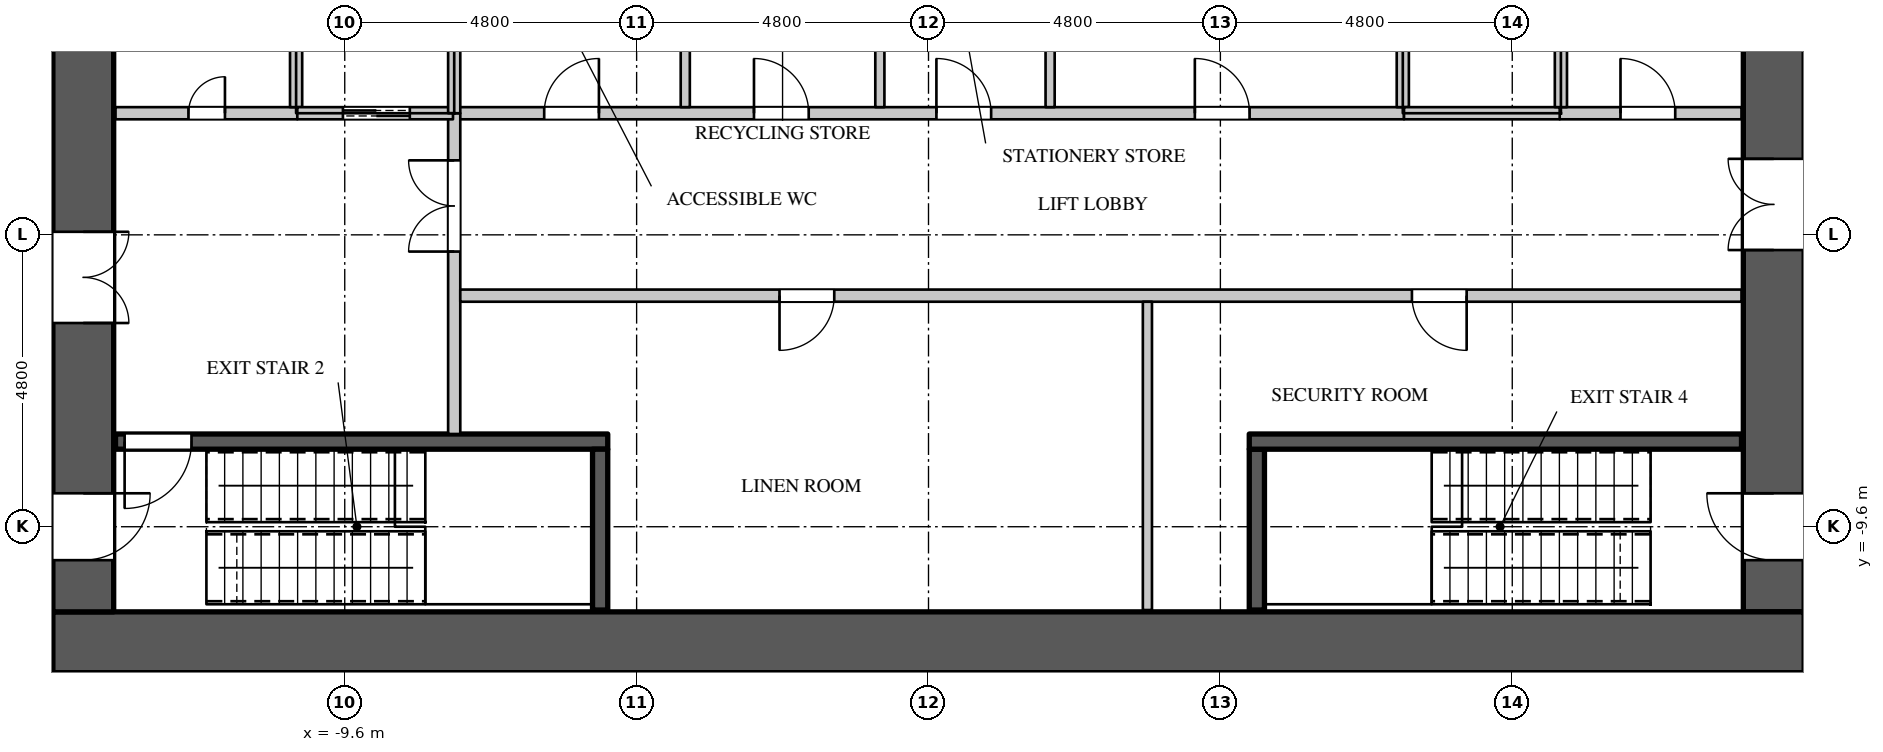
"""IFC4 building model, lengths in metres.
Left out: names, types, materials, properties, quantities, classifications, styles, units other than length and angle.
Written with IfcOpenShell. Run it as: python <this file> out.ifc"""

import sys

from ifc_helpers import new_model, si_unit, direction, frame, frame_2d, origin, place, context, subcontext, project, spatial, rectangle, extrude, element, fill, save


model = new_model("IFC4")
c1 = context("Model", 3, precision=1e-05, world=origin(), true_north=direction((0.0, 1.0)))
c2 = subcontext(c1, "Body", "Model", "MODEL_VIEW")
j1 = project(units=[si_unit("LENGTHUNIT", "METRE"), si_unit("PLANEANGLEUNIT", "RADIAN")], contexts=[c1])
p1 = place(None, origin())
s1 = spatial("IfcSite", under=j1, at=p1, CompositionType="ELEMENT")
p2 = place(p1, origin())
s2 = spatial("IfcBuilding", under=s1, at=p2, CompositionType="ELEMENT")
p3 = place(p2, frame((0.0, 0.0, 59.1)))
s3 = spatial("IfcBuildingStorey", under=s2, at=p3, CompositionType="ELEMENT", Elevation=59.1)
p4 = place(p3, frame((-14.4, -11.5, 0.0), z_axis=(0.0, 0.0, 1.0), x_axis=(1.0, 0.0, 0.0)))
e1 = element("IfcWall", 1, at=p4, inside=s3, PredefinedType="SHEAR", context=c2, shape_type="SweptSolid", body=[
    extrude(rectangle(XDim=28.8, YDim=1.0, at=frame_2d((14.4, 0.0))), origin(), (0.0, 0.0, 1.0), 4.2),
])
p5 = place(p3, frame((13.9, -11.0, 0.0), z_axis=(0.0, 0.0, 1.0), x_axis=(0.0, 1.0, 0.0)))
e2 = element("IfcWall", 2, at=p5, inside=s3, PredefinedType="SHEAR", context=c2, shape_type="SweptSolid", body=[
    extrude(rectangle(XDim=22.0, YDim=1.0, at=frame_2d((11.0, 0.0))), origin(), (0.0, 0.0, 1.0), 4.2),
])
p6 = place(p5, frame((20.05, 0.0, 0.0)))
e3 = element("IfcOpeningElement", 3, at=p6, cuts=e2, PredefinedType="OPENING", context=c2, shape_type="SweptSolid", body=[
    extrude(rectangle(XDim=1.1, YDim=2.2, at=frame_2d((0.55, 1.1))), frame((0.0, 0.51, 0.0), z_axis=(0.0, -1.0, 0.0), x_axis=(1.0, 0.0, 0.0)), (0.0, 0.0, 1.0), 1.02),
])
p7 = place(p5, frame((0.85, 0.0, 0.0)))
e4 = element("IfcOpeningElement", 4, at=p7, cuts=e2, PredefinedType="OPENING", context=c2, shape_type="SweptSolid", body=[
    extrude(rectangle(XDim=1.1, YDim=2.2, at=frame_2d((0.55, 1.1))), frame((0.0, 0.51, 0.0), z_axis=(0.0, -1.0, 0.0), x_axis=(1.0, 0.0, 0.0)), (0.0, 0.0, 1.0), 1.02),
])
p8 = place(p5, frame((14.55, 0.0, 0.0)))
e5 = element("IfcOpeningElement", 5, at=p8, cuts=e2, PredefinedType="OPENING", context=c2, shape_type="SweptSolid", body=[
    extrude(rectangle(XDim=1.5, YDim=2.4, at=frame_2d((0.75, 1.2))), frame((0.0, 0.51, 0.0), z_axis=(0.0, -1.0, 0.0), x_axis=(1.0, 0.0, 0.0)), (0.0, 0.0, 1.0), 1.02),
])
p9 = place(p5, frame((5.95, 0.0, 0.0)))
e6 = element("IfcOpeningElement", 6, at=p9, cuts=e2, PredefinedType="OPENING", context=c2, shape_type="SweptSolid", body=[
    extrude(rectangle(XDim=1.5, YDim=2.4, at=frame_2d((0.75, 1.2))), frame((0.0, 0.51, 0.0), z_axis=(0.0, -1.0, 0.0), x_axis=(1.0, 0.0, 0.0)), (0.0, 0.0, 1.0), 1.02),
])
p10 = place(p3, frame((-13.9, -11.0, 0.0), z_axis=(0.0, 0.0, 1.0), x_axis=(0.0, 1.0, 0.0)))
e7 = element("IfcWall", 7, at=p10, inside=s3, PredefinedType="SHEAR", context=c2, shape_type="SweptSolid", body=[
    extrude(rectangle(XDim=22.0, YDim=1.0, at=frame_2d((11.0, 0.0))), origin(), (0.0, 0.0, 1.0), 4.2),
])
p11 = place(p10, frame((20.05, 0.0, 0.0)))
e8 = element("IfcOpeningElement", 8, at=p11, cuts=e7, PredefinedType="OPENING", context=c2, shape_type="SweptSolid", body=[
    extrude(rectangle(XDim=1.1, YDim=2.2, at=frame_2d((0.55, 1.1))), frame((0.0, 0.51, 0.0), z_axis=(0.0, -1.0, 0.0), x_axis=(1.0, 0.0, 0.0)), (0.0, 0.0, 1.0), 1.02),
])
p12 = place(p10, frame((0.85, 0.0, 0.0)))
e9 = element("IfcOpeningElement", 9, at=p12, cuts=e7, PredefinedType="OPENING", context=c2, shape_type="SweptSolid", body=[
    extrude(rectangle(XDim=1.1, YDim=2.2, at=frame_2d((0.55, 1.1))), frame((0.0, 0.51, 0.0), z_axis=(0.0, -1.0, 0.0), x_axis=(1.0, 0.0, 0.0)), (0.0, 0.0, 1.0), 1.02),
])
p13 = place(p10, frame((15.75, 0.0, 0.0)))
e10 = element("IfcOpeningElement", 10, at=p13, cuts=e7, PredefinedType="OPENING", context=c2, shape_type="SweptSolid", body=[
    extrude(rectangle(XDim=1.5, YDim=2.4, at=frame_2d((0.75, 1.2))), frame((0.0, 0.51, 0.0), z_axis=(0.0, -1.0, 0.0), x_axis=(1.0, 0.0, 0.0)), (0.0, 0.0, 1.0), 1.02),
])
p14 = place(p10, frame((4.75, 0.0, 0.0)))
e11 = element("IfcOpeningElement", 11, at=p14, cuts=e7, PredefinedType="OPENING", context=c2, shape_type="SweptSolid", body=[
    extrude(rectangle(XDim=1.5, YDim=2.4, at=frame_2d((0.75, 1.2))), frame((0.0, 0.51, 0.0), z_axis=(0.0, -1.0, 0.0), x_axis=(1.0, 0.0, 0.0)), (0.0, 0.0, 1.0), 1.02),
])
p15 = place(p3, frame((-7.82, -2.8, 0.0), z_axis=(0.0, 0.0, 1.0), x_axis=(1.0, 0.0, 0.0)))
e12 = element("IfcWall", 12, at=p15, inside=s3, PredefinedType="PARTITIONING", context=c2, shape_type="SweptSolid", body=[
    extrude(rectangle(XDim=15.64, YDim=0.2, at=frame_2d((7.82, 0.0))), origin(), (0.0, 0.0, 1.0), 3.95),
])
p16 = place(p15, frame((1.5, 0.0, 0.0)))
e13 = element("IfcOpeningElement", 13, at=p16, cuts=e12, PredefinedType="OPENING", context=c2, shape_type="SweptSolid", body=[
    extrude(rectangle(XDim=0.9, YDim=2.2, at=frame_2d((0.45, 1.1))), frame((0.0, 0.11, 0.0), z_axis=(0.0, -1.0, 0.0), x_axis=(1.0, 0.0, 0.0)), (0.0, 0.0, 1.0), 0.22),
])
p17 = place(p15, frame((4.95, 0.0, 0.0)))
e14 = element("IfcOpeningElement", 14, at=p17, cuts=e12, PredefinedType="OPENING", context=c2, shape_type="SweptSolid", body=[
    extrude(rectangle(XDim=0.9, YDim=2.2, at=frame_2d((0.45, 1.1))), frame((0.0, 0.11, 0.0), z_axis=(0.0, -1.0, 0.0), x_axis=(1.0, 0.0, 0.0)), (0.0, 0.0, 1.0), 0.22),
])
p18 = place(p15, frame((7.95, 0.0, 0.0)))
e15 = element("IfcOpeningElement", 15, at=p18, cuts=e12, PredefinedType="OPENING", context=c2, shape_type="SweptSolid", body=[
    extrude(rectangle(XDim=0.9, YDim=2.2, at=frame_2d((0.45, 1.1))), frame((0.0, 0.11, 0.0), z_axis=(0.0, -1.0, 0.0), x_axis=(1.0, 0.0, 0.0)), (0.0, 0.0, 1.0), 0.22),
])
p19 = place(p15, frame((12.2, 0.0, 0.0)))
e16 = element("IfcOpeningElement", 16, at=p19, cuts=e12, PredefinedType="OPENING", context=c2, shape_type="SweptSolid", body=[
    extrude(rectangle(XDim=0.9, YDim=2.2, at=frame_2d((0.45, 1.1))), frame((0.0, 0.11, 0.0), z_axis=(0.0, -1.0, 0.0), x_axis=(1.0, 0.0, 0.0)), (0.0, 0.0, 1.0), 0.22),
])
p20 = place(p3, frame((-7.8, -8.075, 0.0), z_axis=(0.0, 0.0, 1.0), x_axis=(0.0, 1.0, 0.0)))
e17 = element("IfcWall", 17, at=p20, inside=s3, PredefinedType="PARTITIONING", context=c2, shape_type="SweptSolid", body=[
    extrude(rectangle(XDim=5.275, YDim=0.2, at=frame_2d((2.637, 0.0))), origin(), (0.0, 0.0, 1.0), 3.95),
])
p21 = place(p20, frame((3.0, 0.0, 0.0)))
e18 = element("IfcOpeningElement", 18, at=p21, cuts=e17, PredefinedType="OPENING", context=c2, shape_type="SweptSolid", body=[
    extrude(rectangle(XDim=1.5, YDim=2.4, at=frame_2d((0.75, 1.2))), frame((0.0, 0.11, 0.0), z_axis=(0.0, -1.0, 0.0), x_axis=(1.0, 0.0, 0.0)), (0.0, 0.0, 1.0), 0.22),
])
p22 = place(p3, frame((-7.7, -5.8, 0.0), z_axis=(0.0, 0.0, 1.0), x_axis=(1.0, 0.0, 0.0)))
e19 = element("IfcWall", 19, at=p22, inside=s3, PredefinedType="PARTITIONING", context=c2, shape_type="SweptSolid", body=[
    extrude(rectangle(XDim=21.07, YDim=0.2, at=frame_2d((10.535, 0.0))), origin(), (0.0, 0.0, 1.0), 3.95),
])
p23 = place(p22, frame((5.25, 0.0, 0.0)))
e20 = element("IfcOpeningElement", 20, at=p23, cuts=e19, PredefinedType="OPENING", context=c2, shape_type="SweptSolid", body=[
    extrude(rectangle(XDim=0.9, YDim=2.2, at=frame_2d((0.45, 1.1))), frame((0.0, 0.11, 0.0), z_axis=(0.0, -1.0, 0.0), x_axis=(1.0, 0.0, 0.0)), (0.0, 0.0, 1.0), 0.22),
])
p24 = place(p22, frame((15.65, 0.0, 0.0)))
e21 = element("IfcOpeningElement", 21, at=p24, cuts=e19, PredefinedType="OPENING", context=c2, shape_type="SweptSolid", body=[
    extrude(rectangle(XDim=0.9, YDim=2.2, at=frame_2d((0.45, 1.1))), frame((0.0, 0.11, 0.0), z_axis=(0.0, -1.0, 0.0), x_axis=(1.0, 0.0, 0.0)), (0.0, 0.0, 1.0), 0.22),
])
for number, where, z_axis, x_axis in (
    (22, (-4.0, -2.7, 0.0), (0.0, 0.0, 1.0), (0.0, 1.0, 0.0)),
    (23, (-0.8, -2.7, 0.0), (0.0, 0.0, 1.0), (0.0, 1.0, 0.0)),
    (24, (2.0, -2.7, 0.0), (0.0, 0.0, 1.0), (0.0, 1.0, 0.0)),
):
    element("IfcWall", number, at=place(p3, frame(where, z_axis=z_axis, x_axis=x_axis)), inside=s3, PredefinedType="PARTITIONING", context=c2, shape_type="SweptSolid", body=[
        extrude(rectangle(XDim=2.6, YDim=0.15, at=frame_2d((1.3, 0.0))), origin(), (0.0, 0.0, 1.0), 3.95),
    ])
p25 = place(p3, frame((3.6, -10.97, 0.0), z_axis=(0.0, 0.0, 1.0), x_axis=(0.0, 1.0, 0.0)))
e25 = element("IfcWall", 25, at=p25, inside=s3, PredefinedType="PARTITIONING", context=c2, shape_type="SweptSolid", body=[
    extrude(rectangle(XDim=5.07, YDim=0.15, at=frame_2d((2.535, 0.0))), origin(), (0.0, 0.0, 1.0), 3.95),
])
p26 = place(p3, frame((-13.37, -2.8, 0.0), z_axis=(0.0, 0.0, 1.0), x_axis=(1.0, 0.0, 0.0)))
e26 = element("IfcWall", 26, at=p26, inside=s3, PredefinedType="PARTITIONING", context=c2, shape_type="SweptSolid", body=[
    extrude(rectangle(XDim=2.99, YDim=0.2, at=frame_2d((1.495, 0.0))), origin(), (0.0, 0.0, 1.0), 3.95),
])
p27 = place(p26, frame((1.2, 0.0, 0.0)))
e27 = element("IfcOpeningElement", 27, at=p27, cuts=e26, PredefinedType="OPENING", context=c2, shape_type="SweptSolid", body=[
    extrude(rectangle(XDim=0.6, YDim=2.0, at=frame_2d((0.3, 1.0))), frame((0.0, 0.11, 0.0), z_axis=(0.0, -1.0, 0.0), x_axis=(1.0, 0.0, 0.0)), (0.0, 0.0, 1.0), 0.22),
])
p28 = place(p3, frame((10.38, -2.8, 0.0), z_axis=(0.0, 0.0, 1.0), x_axis=(1.0, 0.0, 0.0)))
e28 = element("IfcWall", 28, at=p28, inside=s3, PredefinedType="PARTITIONING", context=c2, shape_type="SweptSolid", body=[
    extrude(rectangle(XDim=2.99, YDim=0.2, at=frame_2d((1.495, 0.0))), origin(), (0.0, 0.0, 1.0), 3.95),
])
p29 = place(p28, frame((1.0, 0.0, 0.0)))
e29 = element("IfcOpeningElement", 29, at=p29, cuts=e28, PredefinedType="OPENING", context=c2, shape_type="SweptSolid", body=[
    extrude(rectangle(XDim=0.9, YDim=2.2, at=frame_2d((0.45, 1.1))), frame((0.0, 0.11, 0.0), z_axis=(0.0, -1.0, 0.0), x_axis=(1.0, 0.0, 0.0)), (0.0, 0.0, 1.0), 0.22),
])
p30 = place(p3, frame((-10.4, -2.7, 0.0), z_axis=(0.0, 0.0, 1.0), x_axis=(0.0, 1.0, 0.0)))
e30 = element("IfcWall", 30, at=p30, inside=s3, PredefinedType="PARTITIONING", context=c2, shape_type="SweptSolid", body=[
    extrude(rectangle(XDim=2.7, YDim=0.2, at=frame_2d((1.35, 0.0))), origin(), (0.0, 0.0, 1.0), 3.95),
])
p31 = place(p3, frame((-10.38, -2.8, 0.0), z_axis=(0.0, 0.0, 1.0), x_axis=(1.0, 0.0, 0.0)))
e31 = element("IfcWall", 31, at=p31, inside=s3, PredefinedType="PARTITIONING", context=c2, shape_type="SweptSolid", body=[
    extrude(rectangle(XDim=2.56, YDim=0.2, at=frame_2d((1.28, 0.0))), origin(), (0.0, 0.0, 1.0), 3.95),
])
p32 = place(p31, frame((0.75, 0.0, 0.0)))
e32 = element("IfcOpeningElement", 32, at=p32, cuts=e31, PredefinedType="OPENING", context=c2, shape_type="SweptSolid", body=[
    extrude(rectangle(XDim=1.1, YDim=2.2, at=frame_2d((0.55, 1.1))), frame((0.0, 0.11, 0.0), z_axis=(0.0, -1.0, 0.0), x_axis=(1.0, 0.0, 0.0)), (0.0, 0.0, 1.0), 0.22),
])
p33 = place(p3, frame((-7.8, -2.8, 0.0), z_axis=(0.0, 0.0, 1.0), x_axis=(0.0, 1.0, 0.0)))
e33 = element("IfcWall", 33, at=p33, inside=s3, PredefinedType="PARTITIONING", context=c2, shape_type="SweptSolid", body=[
    extrude(rectangle(XDim=2.8, YDim=0.2, at=frame_2d((1.4, 0.0))), origin(), (0.0, 0.0, 1.0), 3.95),
])
p34 = place(p3, frame((7.8, -2.7, 0.0), z_axis=(0.0, 0.0, 1.0), x_axis=(0.0, 1.0, 0.0)))
e34 = element("IfcWall", 34, at=p34, inside=s3, PredefinedType="PARTITIONING", context=c2, shape_type="SweptSolid", body=[
    extrude(rectangle(XDim=2.7, YDim=0.2, at=frame_2d((1.35, 0.0))), origin(), (0.0, 0.0, 1.0), 3.95),
])
p35 = place(p3, frame((7.82, -2.8, 0.0), z_axis=(0.0, 0.0, 1.0), x_axis=(1.0, 0.0, 0.0)))
e35 = element("IfcWall", 35, at=p35, inside=s3, PredefinedType="PARTITIONING", context=c2, shape_type="SweptSolid", body=[
    extrude(rectangle(XDim=2.56, YDim=0.2, at=frame_2d((1.28, 0.0))), origin(), (0.0, 0.0, 1.0), 3.95),
])
p36 = place(p3, frame((10.4, -2.7, 0.0), z_axis=(0.0, 0.0, 1.0), x_axis=(0.0, 1.0, 0.0)))
e36 = element("IfcWall", 36, at=p36, inside=s3, PredefinedType="PARTITIONING", context=c2, shape_type="SweptSolid", body=[
    extrude(rectangle(XDim=5.4, YDim=0.2, at=frame_2d((2.7, 0.0))), origin(), (0.0, 0.0, 1.0), 3.95),
])
p37 = place(p3, frame((-13.37, -8.2, 0.0), z_axis=(0.0, 0.0, 1.0), x_axis=(1.0, 0.0, 0.0)))
e37 = element("IfcWall", 37, at=p37, inside=s3, PredefinedType="SHEAR", context=c2, shape_type="SweptSolid", body=[
    extrude(rectangle(XDim=8.095, YDim=0.25, at=frame_2d((4.048, 0.0))), origin(), (0.0, 0.0, 1.0), 3.95),
])
p38 = place(p37, frame((0.15, 0.0, 0.0)))
e38 = element("IfcOpeningElement", 38, at=p38, cuts=e37, PredefinedType="OPENING", context=c2, shape_type="SweptSolid", body=[
    extrude(rectangle(XDim=1.1, YDim=2.2, at=frame_2d((0.55, 1.1))), frame((0.0, 0.135, 0.0), z_axis=(0.0, -1.0, 0.0), x_axis=(1.0, 0.0, 0.0)), (0.0, 0.0, 1.0), 0.27),
])
for number, where, z_axis, x_axis in (
    (39, (-5.4, -10.97, 0.0), (0.0, 0.0, 1.0), (0.0, 1.0, 0.0)),
    (40, (5.4, -10.97, 0.0), (0.0, 0.0, 1.0), (0.0, 1.0, 0.0)),
):
    element("IfcWall", number, at=place(p3, frame(where, z_axis=z_axis, x_axis=x_axis)), inside=s3, PredefinedType="SHEAR", context=c2, shape_type="SweptSolid", body=[
        extrude(rectangle(XDim=2.645, YDim=0.25, at=frame_2d((1.323, 0.0))), origin(), (0.0, 0.0, 1.0), 3.95),
    ])
p39 = place(p3, frame((5.275, -8.2, 0.0), z_axis=(0.0, 0.0, 1.0), x_axis=(1.0, 0.0, 0.0)))
e41 = element("IfcWall", 41, at=p39, inside=s3, PredefinedType="SHEAR", context=c2, shape_type="SweptSolid", body=[
    extrude(rectangle(XDim=8.095, YDim=0.25, at=frame_2d((4.048, 0.0))), origin(), (0.0, 0.0, 1.0), 3.95),
])
p40 = place(p27, origin())
e42 = element("IfcDoor", 42, at=p40, inside=s3, OperationType="SINGLE_SWING_RIGHT", PredefinedType="DOOR", context=c2, shape_type="SweptSolid", body=[
    extrude(rectangle(XDim=0.6, YDim=2.0, at=frame_2d((0.3, 1.0))), frame((0.0, 0.025, 0.0), z_axis=(0.0, -1.0, 0.0), x_axis=(1.0, 0.0, 0.0)), (0.0, 0.0, 1.0), 0.05),
])
fill(e27, e42)
p41 = place(p29, origin())
e43 = element("IfcDoor", 43, at=p41, inside=s3, OperationType="SINGLE_SWING_LEFT", PredefinedType="DOOR", context=c2, shape_type="SweptSolid", body=[
    extrude(rectangle(XDim=0.9, YDim=2.2, at=frame_2d((0.45, 1.1))), frame((0.0, 0.025, 0.0), z_axis=(0.0, -1.0, 0.0), x_axis=(1.0, 0.0, 0.0)), (0.0, 0.0, 1.0), 0.05),
])
fill(e29, e43)
p42 = place(p23, origin())
e44 = element("IfcDoor", 44, at=p42, inside=s3, OperationType="SINGLE_SWING_RIGHT", PredefinedType="DOOR", context=c2, shape_type="SweptSolid", body=[
    extrude(rectangle(XDim=0.9, YDim=2.2, at=frame_2d((0.45, 1.1))), frame((0.0, 0.025, 0.0), z_axis=(0.0, -1.0, 0.0), x_axis=(1.0, 0.0, 0.0)), (0.0, 0.0, 1.0), 0.05),
])
fill(e20, e44)
p43 = place(p24, origin())
e45 = element("IfcDoor", 45, at=p43, inside=s3, OperationType="SINGLE_SWING_LEFT", PredefinedType="DOOR", context=c2, shape_type="SweptSolid", body=[
    extrude(rectangle(XDim=0.9, YDim=2.2, at=frame_2d((0.45, 1.1))), frame((0.0, 0.025, 0.0), z_axis=(0.0, -1.0, 0.0), x_axis=(1.0, 0.0, 0.0)), (0.0, 0.0, 1.0), 0.05),
])
fill(e21, e45)
p44 = place(p16, origin())
e46 = element("IfcDoor", 46, at=p44, inside=s3, OperationType="SINGLE_SWING_RIGHT", PredefinedType="DOOR", context=c2, shape_type="SweptSolid", body=[
    extrude(rectangle(XDim=0.9, YDim=2.2, at=frame_2d((0.45, 1.1))), frame((0.0, 0.025, 0.0), z_axis=(0.0, -1.0, 0.0), x_axis=(1.0, 0.0, 0.0)), (0.0, 0.0, 1.0), 0.05),
])
fill(e13, e46)
p45 = place(p17, origin())
e47 = element("IfcDoor", 47, at=p45, inside=s3, OperationType="SINGLE_SWING_LEFT", PredefinedType="DOOR", context=c2, shape_type="SweptSolid", body=[
    extrude(rectangle(XDim=0.9, YDim=2.2, at=frame_2d((0.45, 1.1))), frame((0.0, 0.025, 0.0), z_axis=(0.0, -1.0, 0.0), x_axis=(1.0, 0.0, 0.0)), (0.0, 0.0, 1.0), 0.05),
])
fill(e14, e47)
p46 = place(p18, origin())
e48 = element("IfcDoor", 48, at=p46, inside=s3, OperationType="SINGLE_SWING_LEFT", PredefinedType="DOOR", context=c2, shape_type="SweptSolid", body=[
    extrude(rectangle(XDim=0.9, YDim=2.2, at=frame_2d((0.45, 1.1))), frame((0.0, 0.025, 0.0), z_axis=(0.0, -1.0, 0.0), x_axis=(1.0, 0.0, 0.0)), (0.0, 0.0, 1.0), 0.05),
])
fill(e15, e48)
p47 = place(p19, origin())
e49 = element("IfcDoor", 49, at=p47, inside=s3, OperationType="SINGLE_SWING_LEFT", PredefinedType="DOOR", context=c2, shape_type="SweptSolid", body=[
    extrude(rectangle(XDim=0.9, YDim=2.2, at=frame_2d((0.45, 1.1))), frame((0.0, 0.025, 0.0), z_axis=(0.0, -1.0, 0.0), x_axis=(1.0, 0.0, 0.0)), (0.0, 0.0, 1.0), 0.05),
])
fill(e16, e49)
p48 = place(p32, origin())
e50 = element("IfcDoor", 50, at=p48, inside=s3, OperationType="DOUBLE_DOOR_SLIDING", PredefinedType="DOOR", context=c2, shape_type="SweptSolid", body=[
    extrude(rectangle(XDim=1.1, YDim=2.2, at=frame_2d((0.55, 1.1))), frame((0.0, 0.025, 0.0), z_axis=(0.0, -1.0, 0.0), x_axis=(1.0, 0.0, 0.0)), (0.0, 0.0, 1.0), 0.05),
])
fill(e32, e50)
p49 = place(p38, origin())
e51 = element("IfcDoor", 51, at=p49, inside=s3, OperationType="SINGLE_SWING_RIGHT", PredefinedType="DOOR", context=c2, shape_type="SweptSolid", body=[
    extrude(rectangle(XDim=1.1, YDim=2.2, at=frame_2d((0.55, 1.1))), frame((0.0, 0.025, 0.0), z_axis=(0.0, -1.0, 0.0), x_axis=(1.0, 0.0, 0.0)), (0.0, 0.0, 1.0), 0.05),
])
fill(e38, e51)
p50 = place(p21, origin())
e52 = element("IfcDoor", 52, at=p50, inside=s3, OperationType="DOUBLE_DOOR_SINGLE_SWING", PredefinedType="DOOR", context=c2, shape_type="SweptSolid", body=[
    extrude(rectangle(XDim=1.5, YDim=2.4, at=frame_2d((0.75, 1.2))), frame((0.0, 0.025, 0.0), z_axis=(0.0, -1.0, 0.0), x_axis=(1.0, 0.0, 0.0)), (0.0, 0.0, 1.0), 0.05),
])
fill(e18, e52)
p51 = place(p12, origin())
e53 = element("IfcDoor", 53, at=p51, inside=s3, OperationType="SINGLE_SWING_LEFT", PredefinedType="DOOR", context=c2, shape_type="SweptSolid", body=[
    extrude(rectangle(XDim=1.1, YDim=2.2, at=frame_2d((0.55, 1.1))), frame((0.0, -0.445, 0.0), z_axis=(0.0, -1.0, 0.0), x_axis=(1.0, 0.0, 0.0)), (0.0, 0.0, 1.0), 0.05),
])
fill(e9, e53)
p52 = place(p7, origin())
e54 = element("IfcDoor", 54, at=p52, inside=s3, OperationType="SINGLE_SWING_RIGHT", PredefinedType="DOOR", context=c2, shape_type="SweptSolid", body=[
    extrude(rectangle(XDim=1.1, YDim=2.2, at=frame_2d((0.55, 1.1))), frame((0.0, 0.495, 0.0), z_axis=(0.0, -1.0, 0.0), x_axis=(1.0, 0.0, 0.0)), (0.0, 0.0, 1.0), 0.05),
])
fill(e4, e54)
p53 = place(p14, origin())
e55 = element("IfcDoor", 55, at=p53, inside=s3, OperationType="DOUBLE_DOOR_SINGLE_SWING", PredefinedType="DOOR", context=c2, shape_type="SweptSolid", body=[
    extrude(rectangle(XDim=1.5, YDim=2.4, at=frame_2d((0.75, 1.2))), frame((0.0, -0.445, 0.0), z_axis=(0.0, -1.0, 0.0), x_axis=(1.0, 0.0, 0.0)), (0.0, 0.0, 1.0), 0.05),
])
fill(e11, e55)
p54 = place(p9, origin())
e56 = element("IfcDoor", 56, at=p54, inside=s3, OperationType="DOUBLE_DOOR_SINGLE_SWING", PredefinedType="DOOR", context=c2, shape_type="SweptSolid", body=[
    extrude(rectangle(XDim=1.5, YDim=2.4, at=frame_2d((0.75, 1.2))), frame((0.0, 0.495, 0.0), z_axis=(0.0, -1.0, 0.0), x_axis=(1.0, 0.0, 0.0)), (0.0, 0.0, 1.0), 0.05),
])
fill(e6, e56)
save(model, sys.argv[1])
